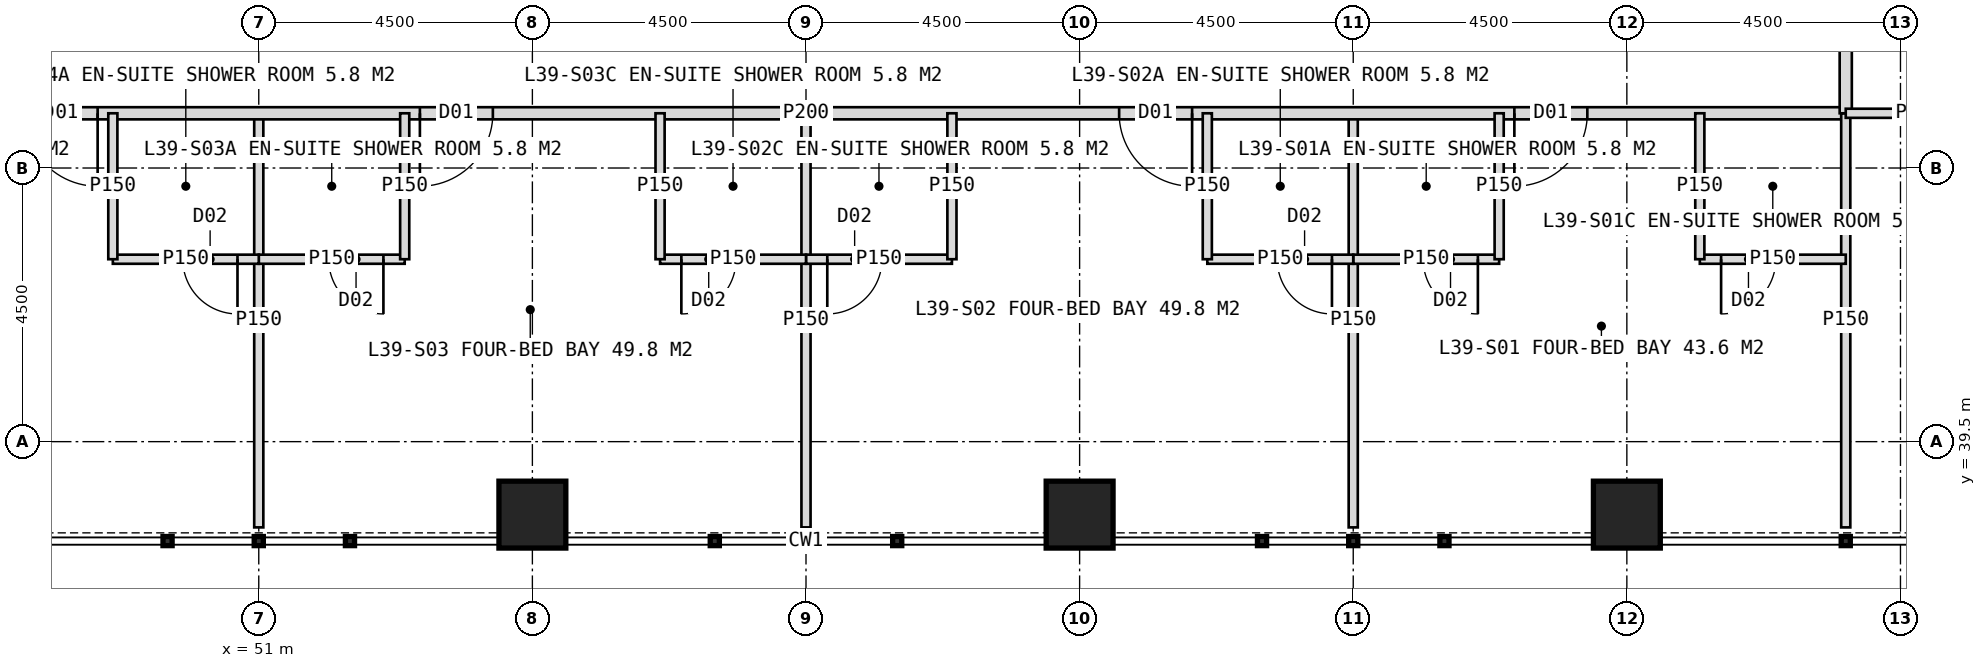
"""IFC4 building model, lengths in metres.
Left out: names, types, materials, properties, quantities, classifications, styles, units other than length and angle.
Written with IfcOpenShell. Run it as: python <this file> out.ifc"""

import sys

from ifc_helpers import new_model, si_unit, direction, frame, frame_2d, origin, origin_2d, place, context, subcontext, project, spatial, rectangle, hollow_rectangle, extrude, element, fill, save


model = new_model("IFC4")
c1 = context("Model", 3, precision=1e-05, world=origin(), true_north=direction((0.0, 1.0)))
c2 = subcontext(c1, "Body", "Model", "MODEL_VIEW")
j1 = project(units=[si_unit("LENGTHUNIT", "METRE"), si_unit("PLANEANGLEUNIT", "RADIAN")], contexts=[c1])
p1 = place(None, origin())
s1 = spatial("IfcSite", under=j1, at=p1, CompositionType="ELEMENT")
p2 = place(p1, origin())
s2 = spatial("IfcBuilding", under=s1, at=p2, CompositionType="ELEMENT")
p3 = place(p2, frame((0.0, 0.0, 164.0)))
s3 = spatial("IfcBuildingStorey", under=s2, at=p3, CompositionType="ELEMENT", Elevation=164.0)
for number, where, z_axis, x_axis in (
    (1, (55.5, 38.3, 0.0), (0.0, 0.0, 1.0), (1.0, 0.0, 0.0)),
    (2, (64.5, 38.3, 0.0), (0.0, 0.0, 1.0), (1.0, 0.0, 0.0)),
    (3, (73.5, 38.3, 0.0), (0.0, 0.0, 1.0), (1.0, 0.0, 0.0)),
):
    element("IfcColumn", number, at=place(p3, frame(where, z_axis=z_axis, x_axis=x_axis)), inside=s3, PredefinedType="COLUMN", context=c2, shape_type="SweptSolid", body=[
        extrude(hollow_rectangle(XDim=1.1, YDim=1.1, WallThickness=0.1, at=origin_2d()), origin(), (0.0, 0.0, 1.0), 4.0),
    ])
p4 = place(p3, frame((69.0, 44.9, 0.0), z_axis=(0.0, 0.0, 1.0), x_axis=(0.0, -1.0, 0.0)))
e4 = element("IfcWall", 4, at=p4, inside=s3, PredefinedType="PARTITIONING", context=c2, shape_type="SweptSolid", body=[
    extrude(rectangle(XDim=6.81, YDim=0.15, at=frame_2d((3.405, 0.0))), origin(), (0.0, 0.0, 1.0), 3.75),
])
p5 = place(p3, frame((60.0, 44.9, 0.0), z_axis=(0.0, 0.0, 1.0), x_axis=(0.0, -1.0, 0.0)))
e5 = element("IfcWall", 5, at=p5, inside=s3, PredefinedType="PARTITIONING", context=c2, shape_type="SweptSolid", body=[
    extrude(rectangle(XDim=6.81, YDim=0.15, at=frame_2d((3.405, 0.0))), origin(), (0.0, 0.0, 1.0), 2.95),
])
p6 = place(p3, frame((51.0, 44.9, 0.0), z_axis=(0.0, 0.0, 1.0), x_axis=(0.0, -1.0, 0.0)))
e6 = element("IfcWall", 6, at=p6, inside=s3, PredefinedType="PARTITIONING", context=c2, shape_type="SweptSolid", body=[
    extrude(rectangle(XDim=6.81, YDim=0.15, at=frame_2d((3.405, 0.0))), origin(), (0.0, 0.0, 1.0), 3.75),
])
p7 = place(p3, frame((77.1, 44.9, 0.0), z_axis=(0.0, 0.0, 1.0), x_axis=(-1.0, 0.0, 0.0)))
e7 = element("IfcWall", 7, at=p7, inside=s3, PredefinedType="PARTITIONING", context=c2, shape_type="SweptSolid", body=[
    extrude(rectangle(XDim=34.2, YDim=0.2, at=frame_2d((17.1, 0.0))), origin(), (0.0, 0.0, 1.0), 3.75),
])
p8 = place(p7, frame((4.25, 0.0, 0.0)))
e8 = element("IfcOpeningElement", 8, at=p8, cuts=e7, PredefinedType="OPENING", context=c2, shape_type="SweptSolid", body=[
    extrude(rectangle(XDim=1.2, YDim=2.2, at=frame_2d((0.6, 1.1))), frame((0.0, 0.11, 0.0), z_axis=(0.0, -1.0, 0.0), x_axis=(1.0, 0.0, 0.0)), (0.0, 0.0, 1.0), 0.22),
])
p9 = place(p7, frame((10.75, 0.0, 0.0)))
e9 = element("IfcOpeningElement", 9, at=p9, cuts=e7, PredefinedType="OPENING", context=c2, shape_type="SweptSolid", body=[
    extrude(rectangle(XDim=1.2, YDim=2.2, at=frame_2d((0.6, 1.1))), frame((0.0, 0.11, 0.0), z_axis=(0.0, -1.0, 0.0), x_axis=(1.0, 0.0, 0.0)), (0.0, 0.0, 1.0), 0.22),
])
p10 = place(p7, frame((22.25, 0.0, 0.0)))
e10 = element("IfcOpeningElement", 10, at=p10, cuts=e7, PredefinedType="OPENING", context=c2, shape_type="SweptSolid", body=[
    extrude(rectangle(XDim=1.2, YDim=2.2, at=frame_2d((0.6, 1.1))), frame((0.0, 0.11, 0.0), z_axis=(0.0, -1.0, 0.0), x_axis=(1.0, 0.0, 0.0)), (0.0, 0.0, 1.0), 0.22),
])
p11 = place(p7, frame((28.75, 0.0, 0.0)))
e11 = element("IfcOpeningElement", 11, at=p11, cuts=e7, PredefinedType="OPENING", context=c2, shape_type="SweptSolid", body=[
    extrude(rectangle(XDim=1.2, YDim=2.2, at=frame_2d((0.6, 1.1))), frame((0.0, 0.11, 0.0), z_axis=(0.0, -1.0, 0.0), x_axis=(1.0, 0.0, 0.0)), (0.0, 0.0, 1.0), 0.22),
])
p12 = place(p3, frame((77.1, 44.9, 0.0), z_axis=(0.0, 0.0, 1.0), x_axis=(0.0, -1.0, 0.0)))
e12 = element("IfcWall", 12, at=p12, inside=s3, PredefinedType="PARTITIONING", context=c2, shape_type="SweptSolid", body=[
    extrude(rectangle(XDim=6.81, YDim=0.15, at=frame_2d((3.405, 0.0))), origin(), (0.0, 0.0, 1.0), 3.75),
])
p13 = place(p3, frame((71.4, 42.5, 0.0), z_axis=(0.0, 0.0, 1.0), x_axis=(-1.0, 0.0, 0.0)))
e13 = element("IfcWall", 13, at=p13, inside=s3, PredefinedType="PARTITIONING", context=c2, shape_type="SweptSolid", body=[
    extrude(rectangle(XDim=2.4, YDim=0.15, at=frame_2d((1.2, 0.0))), origin(), (0.0, 0.0, 1.0), 3.75),
])
p14 = place(p13, frame((0.35, 0.0, 0.0)))
e14 = element("IfcOpeningElement", 14, at=p14, cuts=e13, PredefinedType="OPENING", context=c2, shape_type="SweptSolid", body=[
    extrude(rectangle(XDim=0.9, YDim=2.1, at=frame_2d((0.45, 1.05))), frame((0.0, 0.085, 0.0), z_axis=(0.0, -1.0, 0.0), x_axis=(1.0, 0.0, 0.0)), (0.0, 0.0, 1.0), 0.17),
])
p15 = place(p3, frame((71.4, 44.9, 0.0), z_axis=(0.0, 0.0, 1.0), x_axis=(0.0, -1.0, 0.0)))
e15 = element("IfcWall", 15, at=p15, inside=s3, PredefinedType="PARTITIONING", context=c2, shape_type="SweptSolid", body=[
    extrude(rectangle(XDim=2.4, YDim=0.15, at=frame_2d((1.2, 0.0))), origin(), (0.0, 0.0, 1.0), 3.75),
])
p16 = place(p3, frame((77.1, 42.5, 0.0), z_axis=(0.0, 0.0, 1.0), x_axis=(-1.0, 0.0, 0.0)))
e16 = element("IfcWall", 16, at=p16, inside=s3, PredefinedType="PARTITIONING", context=c2, shape_type="SweptSolid", body=[
    extrude(rectangle(XDim=2.4, YDim=0.15, at=frame_2d((1.2, 0.0))), origin(), (0.0, 0.0, 1.0), 3.75),
])
p17 = place(p16, frame((1.15, 0.0, 0.0)))
e17 = element("IfcOpeningElement", 17, at=p17, cuts=e16, PredefinedType="OPENING", context=c2, shape_type="SweptSolid", body=[
    extrude(rectangle(XDim=0.9, YDim=2.1, at=frame_2d((0.45, 1.05))), frame((0.0, 0.085, 0.0), z_axis=(0.0, -1.0, 0.0), x_axis=(1.0, 0.0, 0.0)), (0.0, 0.0, 1.0), 0.17),
])
p18 = place(p3, frame((74.7, 44.9, 0.0), z_axis=(0.0, 0.0, 1.0), x_axis=(0.0, -1.0, 0.0)))
e18 = element("IfcWall", 18, at=p18, inside=s3, PredefinedType="PARTITIONING", context=c2, shape_type="SweptSolid", body=[
    extrude(rectangle(XDim=2.4, YDim=0.15, at=frame_2d((1.2, 0.0))), origin(), (0.0, 0.0, 1.0), 3.75),
])
p19 = place(p3, frame((69.0, 42.5, 0.0), z_axis=(0.0, 0.0, 1.0), x_axis=(-1.0, 0.0, 0.0)))
e19 = element("IfcWall", 19, at=p19, inside=s3, PredefinedType="PARTITIONING", context=c2, shape_type="SweptSolid", body=[
    extrude(rectangle(XDim=2.4, YDim=0.15, at=frame_2d((1.2, 0.0))), origin(), (0.0, 0.0, 1.0), 3.75),
])
p20 = place(p19, frame((0.35, 0.0, 0.0)))
e20 = element("IfcOpeningElement", 20, at=p20, cuts=e19, PredefinedType="OPENING", context=c2, shape_type="SweptSolid", body=[
    extrude(rectangle(XDim=0.9, YDim=2.1, at=frame_2d((0.45, 1.05))), frame((0.0, 0.085, 0.0), z_axis=(0.0, -1.0, 0.0), x_axis=(1.0, 0.0, 0.0)), (0.0, 0.0, 1.0), 0.17),
])
p21 = place(p3, frame((66.6, 44.9, 0.0), z_axis=(0.0, 0.0, 1.0), x_axis=(0.0, -1.0, 0.0)))
e21 = element("IfcWall", 21, at=p21, inside=s3, PredefinedType="PARTITIONING", context=c2, shape_type="SweptSolid", body=[
    extrude(rectangle(XDim=2.4, YDim=0.15, at=frame_2d((1.2, 0.0))), origin(), (0.0, 0.0, 1.0), 3.75),
])
p22 = place(p3, frame((62.4, 42.5, 0.0), z_axis=(0.0, 0.0, 1.0), x_axis=(-1.0, 0.0, 0.0)))
e22 = element("IfcWall", 22, at=p22, inside=s3, PredefinedType="PARTITIONING", context=c2, shape_type="SweptSolid", body=[
    extrude(rectangle(XDim=2.4, YDim=0.15, at=frame_2d((1.2, 0.0))), origin(), (0.0, 0.0, 1.0), 3.75),
])
p23 = place(p22, frame((1.15, 0.0, 0.0)))
e23 = element("IfcOpeningElement", 23, at=p23, cuts=e22, PredefinedType="OPENING", context=c2, shape_type="SweptSolid", body=[
    extrude(rectangle(XDim=0.9, YDim=2.1, at=frame_2d((0.45, 1.05))), frame((0.0, 0.085, 0.0), z_axis=(0.0, -1.0, 0.0), x_axis=(1.0, 0.0, 0.0)), (0.0, 0.0, 1.0), 0.17),
])
p24 = place(p3, frame((62.4, 44.9, 0.0), z_axis=(0.0, 0.0, 1.0), x_axis=(0.0, -1.0, 0.0)))
e24 = element("IfcWall", 24, at=p24, inside=s3, PredefinedType="PARTITIONING", context=c2, shape_type="SweptSolid", body=[
    extrude(rectangle(XDim=2.4, YDim=0.15, at=frame_2d((1.2, 0.0))), origin(), (0.0, 0.0, 1.0), 3.75),
])
p25 = place(p3, frame((53.4, 42.5, 0.0), z_axis=(0.0, 0.0, 1.0), x_axis=(-1.0, 0.0, 0.0)))
e25 = element("IfcWall", 25, at=p25, inside=s3, PredefinedType="PARTITIONING", context=c2, shape_type="SweptSolid", body=[
    extrude(rectangle(XDim=2.4, YDim=0.15, at=frame_2d((1.2, 0.0))), origin(), (0.0, 0.0, 1.0), 3.75),
])
p26 = place(p25, frame((0.35, 0.0, 0.0)))
e26 = element("IfcOpeningElement", 26, at=p26, cuts=e25, PredefinedType="OPENING", context=c2, shape_type="SweptSolid", body=[
    extrude(rectangle(XDim=0.9, YDim=2.1, at=frame_2d((0.45, 1.05))), frame((0.0, 0.085, 0.0), z_axis=(0.0, -1.0, 0.0), x_axis=(1.0, 0.0, 0.0)), (0.0, 0.0, 1.0), 0.17),
])
p27 = place(p3, frame((53.4, 44.9, 0.0), z_axis=(0.0, 0.0, 1.0), x_axis=(0.0, -1.0, 0.0)))
e27 = element("IfcWall", 27, at=p27, inside=s3, PredefinedType="PARTITIONING", context=c2, shape_type="SweptSolid", body=[
    extrude(rectangle(XDim=2.4, YDim=0.15, at=frame_2d((1.2, 0.0))), origin(), (0.0, 0.0, 1.0), 3.75),
])
p28 = place(p3, frame((60.0, 42.5, 0.0), z_axis=(0.0, 0.0, 1.0), x_axis=(-1.0, 0.0, 0.0)))
e28 = element("IfcWall", 28, at=p28, inside=s3, PredefinedType="PARTITIONING", context=c2, shape_type="SweptSolid", body=[
    extrude(rectangle(XDim=2.4, YDim=0.15, at=frame_2d((1.2, 0.0))), origin(), (0.0, 0.0, 1.0), 3.75),
])
p29 = place(p28, frame((1.15, 0.0, 0.0)))
e29 = element("IfcOpeningElement", 29, at=p29, cuts=e28, PredefinedType="OPENING", context=c2, shape_type="SweptSolid", body=[
    extrude(rectangle(XDim=0.9, YDim=2.1, at=frame_2d((0.45, 1.05))), frame((0.0, 0.085, 0.0), z_axis=(0.0, -1.0, 0.0), x_axis=(1.0, 0.0, 0.0)), (0.0, 0.0, 1.0), 0.17),
])
p30 = place(p3, frame((57.6, 44.9, 0.0), z_axis=(0.0, 0.0, 1.0), x_axis=(0.0, -1.0, 0.0)))
e30 = element("IfcWall", 30, at=p30, inside=s3, PredefinedType="PARTITIONING", context=c2, shape_type="SweptSolid", body=[
    extrude(rectangle(XDim=2.4, YDim=0.15, at=frame_2d((1.2, 0.0))), origin(), (0.0, 0.0, 1.0), 3.75),
])
p31 = place(p3, frame((51.0, 42.5, 0.0), z_axis=(0.0, 0.0, 1.0), x_axis=(-1.0, 0.0, 0.0)))
e31 = element("IfcWall", 31, at=p31, inside=s3, PredefinedType="PARTITIONING", context=c2, shape_type="SweptSolid", body=[
    extrude(rectangle(XDim=2.4, YDim=0.15, at=frame_2d((1.2, 0.0))), origin(), (0.0, 0.0, 1.0), 3.75),
])
p32 = place(p31, frame((0.35, 0.0, 0.0)))
e32 = element("IfcOpeningElement", 32, at=p32, cuts=e31, PredefinedType="OPENING", context=c2, shape_type="SweptSolid", body=[
    extrude(rectangle(XDim=0.9, YDim=2.1, at=frame_2d((0.45, 1.05))), frame((0.0, 0.085, 0.0), z_axis=(0.0, -1.0, 0.0), x_axis=(1.0, 0.0, 0.0)), (0.0, 0.0, 1.0), 0.17),
])
p33 = place(p3, frame((48.6, 44.9, 0.0), z_axis=(0.0, 0.0, 1.0), x_axis=(0.0, -1.0, 0.0)))
e33 = element("IfcWall", 33, at=p33, inside=s3, PredefinedType="PARTITIONING", context=c2, shape_type="SweptSolid", body=[
    extrude(rectangle(XDim=2.4, YDim=0.15, at=frame_2d((1.2, 0.0))), origin(), (0.0, 0.0, 1.0), 3.75),
])
p34 = place(p3, frame((77.1, 79.1, 0.0), z_axis=(0.0, 0.0, 1.0), x_axis=(0.0, -1.0, 0.0)))
e34 = element("IfcWall", 34, at=p34, inside=s3, PredefinedType="PARTITIONING", context=c2, shape_type="SweptSolid", body=[
    extrude(rectangle(XDim=34.2, YDim=0.2, at=frame_2d((17.1, 0.0))), origin(), (0.0, 0.0, 1.0), 3.75),
])
p35 = place(p34, frame((3.65, 0.0, 0.0)))
e35 = element("IfcOpeningElement", 35, at=p35, cuts=e34, PredefinedType="OPENING", context=c2, shape_type="SweptSolid", body=[
    extrude(rectangle(XDim=1.2, YDim=2.2, at=frame_2d((0.6, 1.1))), frame((0.0, 0.11, 0.0), z_axis=(0.0, -1.0, 0.0), x_axis=(1.0, 0.0, 0.0)), (0.0, 0.0, 1.0), 0.22),
])
p36 = place(p34, frame((10.75, 0.0, 0.0)))
e36 = element("IfcOpeningElement", 36, at=p36, cuts=e34, PredefinedType="OPENING", context=c2, shape_type="SweptSolid", body=[
    extrude(rectangle(XDim=1.2, YDim=2.2, at=frame_2d((0.6, 1.1))), frame((0.0, 0.11, 0.0), z_axis=(0.0, -1.0, 0.0), x_axis=(1.0, 0.0, 0.0)), (0.0, 0.0, 1.0), 0.22),
])
p37 = place(p34, frame((22.25, 0.0, 0.0)))
e37 = element("IfcOpeningElement", 37, at=p37, cuts=e34, PredefinedType="OPENING", context=c2, shape_type="SweptSolid", body=[
    extrude(rectangle(XDim=1.2, YDim=2.2, at=frame_2d((0.6, 1.1))), frame((0.0, 0.11, 0.0), z_axis=(0.0, -1.0, 0.0), x_axis=(1.0, 0.0, 0.0)), (0.0, 0.0, 1.0), 0.22),
])
p38 = place(p34, frame((28.75, 0.0, 0.0)))
e38 = element("IfcOpeningElement", 38, at=p38, cuts=e34, PredefinedType="OPENING", context=c2, shape_type="SweptSolid", body=[
    extrude(rectangle(XDim=1.2, YDim=2.2, at=frame_2d((0.6, 1.1))), frame((0.0, 0.11, 0.0), z_axis=(0.0, -1.0, 0.0), x_axis=(1.0, 0.0, 0.0)), (0.0, 0.0, 1.0), 0.22),
])
p39 = place(p3, frame((77.1, 44.9, 0.0), z_axis=(0.0, 0.0, 1.0), x_axis=(1.0, 0.0, 0.0)))
e39 = element("IfcWall", 39, at=p39, inside=s3, PredefinedType="PARTITIONING", context=c2, shape_type="SweptSolid", body=[
    extrude(rectangle(XDim=2.4, YDim=0.15, at=frame_2d((1.2, 0.0))), origin(), (0.0, 0.0, 1.0), 3.75),
])
p40 = place(p8, origin())
e40 = element("IfcDoor", 40, at=p40, inside=s3, OperationType="SINGLE_SWING_RIGHT", PredefinedType="DOOR", context=c2, shape_type="SweptSolid", body=[
    extrude(rectangle(XDim=1.2, YDim=2.2, at=frame_2d((0.6, 1.1))), frame((0.0, 0.025, 0.0), z_axis=(0.0, -1.0, 0.0), x_axis=(1.0, 0.0, 0.0)), (0.0, 0.0, 1.0), 0.05),
])
fill(e8, e40)
p41 = place(p14, origin())
e41 = element("IfcDoor", 41, at=p41, inside=s3, OperationType="SINGLE_SWING_LEFT", PredefinedType="DOOR", context=c2, shape_type="SweptSolid", body=[
    extrude(rectangle(XDim=0.9, YDim=2.1, at=frame_2d((0.45, 1.05))), frame((0.0, 0.025, 0.0), z_axis=(0.0, -1.0, 0.0), x_axis=(1.0, 0.0, 0.0)), (0.0, 0.0, 1.0), 0.05),
])
fill(e14, e41)
p42 = place(p17, origin())
e42 = element("IfcDoor", 42, at=p42, inside=s3, OperationType="SINGLE_SWING_RIGHT", PredefinedType="DOOR", context=c2, shape_type="SweptSolid", body=[
    extrude(rectangle(XDim=0.9, YDim=2.1, at=frame_2d((0.45, 1.05))), frame((0.0, 0.025, 0.0), z_axis=(0.0, -1.0, 0.0), x_axis=(1.0, 0.0, 0.0)), (0.0, 0.0, 1.0), 0.05),
])
fill(e17, e42)
p43 = place(p9, origin())
e43 = element("IfcDoor", 43, at=p43, inside=s3, OperationType="SINGLE_SWING_LEFT", PredefinedType="DOOR", context=c2, shape_type="SweptSolid", body=[
    extrude(rectangle(XDim=1.2, YDim=2.2, at=frame_2d((0.6, 1.1))), frame((0.0, 0.025, 0.0), z_axis=(0.0, -1.0, 0.0), x_axis=(1.0, 0.0, 0.0)), (0.0, 0.0, 1.0), 0.05),
])
fill(e9, e43)
p44 = place(p20, origin())
e44 = element("IfcDoor", 44, at=p44, inside=s3, OperationType="SINGLE_SWING_LEFT", PredefinedType="DOOR", context=c2, shape_type="SweptSolid", body=[
    extrude(rectangle(XDim=0.9, YDim=2.1, at=frame_2d((0.45, 1.05))), frame((0.0, 0.025, 0.0), z_axis=(0.0, -1.0, 0.0), x_axis=(1.0, 0.0, 0.0)), (0.0, 0.0, 1.0), 0.05),
])
fill(e20, e44)
p45 = place(p23, origin())
e45 = element("IfcDoor", 45, at=p45, inside=s3, OperationType="SINGLE_SWING_RIGHT", PredefinedType="DOOR", context=c2, shape_type="SweptSolid", body=[
    extrude(rectangle(XDim=0.9, YDim=2.1, at=frame_2d((0.45, 1.05))), frame((0.0, 0.025, 0.0), z_axis=(0.0, -1.0, 0.0), x_axis=(1.0, 0.0, 0.0)), (0.0, 0.0, 1.0), 0.05),
])
fill(e23, e45)
p46 = place(p10, origin())
e46 = element("IfcDoor", 46, at=p46, inside=s3, OperationType="SINGLE_SWING_RIGHT", PredefinedType="DOOR", context=c2, shape_type="SweptSolid", body=[
    extrude(rectangle(XDim=1.2, YDim=2.2, at=frame_2d((0.6, 1.1))), frame((0.0, 0.025, 0.0), z_axis=(0.0, -1.0, 0.0), x_axis=(1.0, 0.0, 0.0)), (0.0, 0.0, 1.0), 0.05),
])
fill(e10, e46)
p47 = place(p26, origin())
e47 = element("IfcDoor", 47, at=p47, inside=s3, OperationType="SINGLE_SWING_LEFT", PredefinedType="DOOR", context=c2, shape_type="SweptSolid", body=[
    extrude(rectangle(XDim=0.9, YDim=2.1, at=frame_2d((0.45, 1.05))), frame((0.0, 0.025, 0.0), z_axis=(0.0, -1.0, 0.0), x_axis=(1.0, 0.0, 0.0)), (0.0, 0.0, 1.0), 0.05),
])
fill(e26, e47)
p48 = place(p29, origin())
e48 = element("IfcDoor", 48, at=p48, inside=s3, OperationType="SINGLE_SWING_RIGHT", PredefinedType="DOOR", context=c2, shape_type="SweptSolid", body=[
    extrude(rectangle(XDim=0.9, YDim=2.1, at=frame_2d((0.45, 1.05))), frame((0.0, 0.025, 0.0), z_axis=(0.0, -1.0, 0.0), x_axis=(1.0, 0.0, 0.0)), (0.0, 0.0, 1.0), 0.05),
])
fill(e29, e48)
p49 = place(p11, origin())
e49 = element("IfcDoor", 49, at=p49, inside=s3, OperationType="SINGLE_SWING_LEFT", PredefinedType="DOOR", context=c2, shape_type="SweptSolid", body=[
    extrude(rectangle(XDim=1.2, YDim=2.2, at=frame_2d((0.6, 1.1))), frame((0.0, 0.025, 0.0), z_axis=(0.0, -1.0, 0.0), x_axis=(1.0, 0.0, 0.0)), (0.0, 0.0, 1.0), 0.05),
])
fill(e11, e49)
p50 = place(p32, origin())
e50 = element("IfcDoor", 50, at=p50, inside=s3, OperationType="SINGLE_SWING_LEFT", PredefinedType="DOOR", context=c2, shape_type="SweptSolid", body=[
    extrude(rectangle(XDim=0.9, YDim=2.1, at=frame_2d((0.45, 1.05))), frame((0.0, 0.025, 0.0), z_axis=(0.0, -1.0, 0.0), x_axis=(1.0, 0.0, 0.0)), (0.0, 0.0, 1.0), 0.05),
])
fill(e32, e50)
save(model, sys.argv[1])
